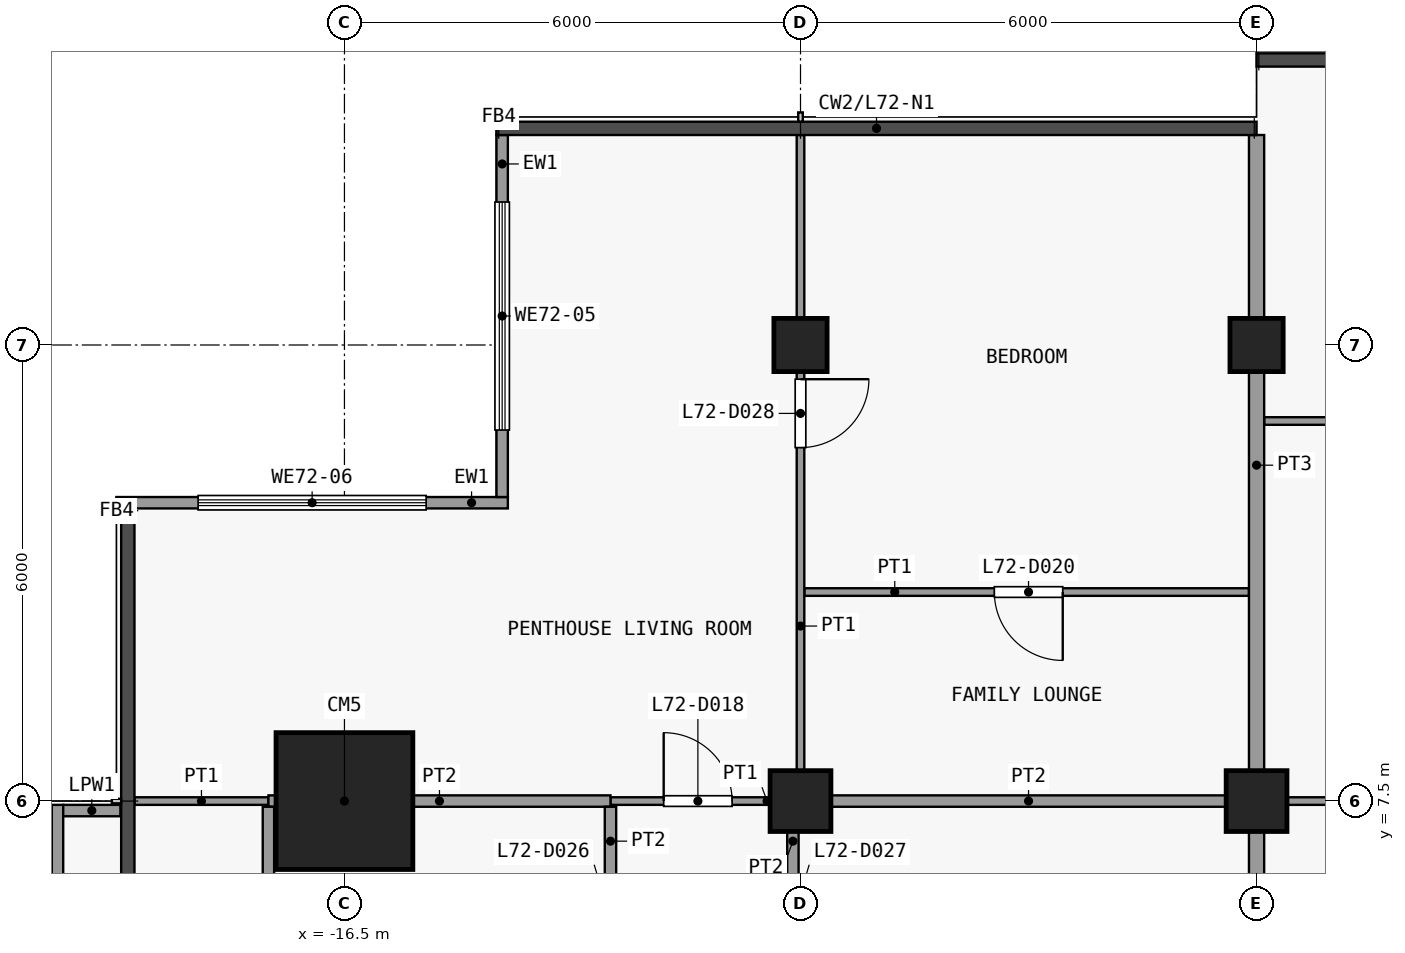
"""IFC4 building model, lengths in metres.
Left out: names, types, materials, properties, quantities, classifications, styles, units other than length and angle.
Written with IfcOpenShell. Run it as: python <this file> out.ifc"""

import sys

from ifc_helpers import new_model, si_unit, direction, frame, frame_2d, origin, origin_2d, place, context, subcontext, project, spatial, rectangle, extrude, element, fill, save


model = new_model("IFC4")
c1 = context("Model", 3, precision=1e-05, world=origin(), true_north=direction((0.0, 1.0)))
c2 = subcontext(c1, "Body", "Model", "MODEL_VIEW")
j1 = project(units=[si_unit("LENGTHUNIT", "METRE"), si_unit("PLANEANGLEUNIT", "RADIAN")], contexts=[c1])
p1 = place(None, origin())
s1 = spatial("IfcSite", under=j1, at=p1, CompositionType="ELEMENT")
p2 = place(p1, origin())
s2 = spatial("IfcBuilding", under=s1, at=p2, CompositionType="ELEMENT")
p3 = place(p2, frame((0.0, 0.0, 284.3)))
s3 = spatial("IfcBuildingStorey", under=s2, at=p3, CompositionType="ELEMENT", Elevation=284.3)
p4 = place(p3, frame((-16.5, 7.5, 0.0), z_axis=(0.0, 0.0, 1.0), x_axis=(1.0, 0.0, 0.0)))
e1 = element("IfcColumn", 1, at=p4, inside=s3, PredefinedType="COLUMN", context=c2, shape_type="SweptSolid", body=[
    extrude(rectangle(XDim=1.8, YDim=1.8, at=origin_2d()), origin(), (0.0, 0.0, 1.0), 3.6),
])
p5 = place(p3, frame((-10.5, 7.5, 0.0), z_axis=(0.0, 0.0, 1.0), x_axis=(1.0, 0.0, 0.0)))
e2 = element("IfcColumn", 2, at=p5, inside=s3, PredefinedType="COLUMN", context=c2, shape_type="SweptSolid", body=[
    extrude(rectangle(XDim=0.8, YDim=0.8, at=origin_2d()), origin(), (0.0, 0.0, 1.0), 3.6),
])
p6 = place(p3, frame((-10.5, 13.5, 0.0), z_axis=(0.0, 0.0, 1.0), x_axis=(1.0, 0.0, 0.0)))
e3 = element("IfcColumn", 3, at=p6, inside=s3, PredefinedType="COLUMN", context=c2, shape_type="SweptSolid", body=[
    extrude(rectangle(XDim=0.7, YDim=0.7, at=origin_2d()), origin(), (0.0, 0.0, 1.0), 3.6),
])
p7 = place(p3, frame((-4.5, 7.5, 0.0), z_axis=(0.0, 0.0, 1.0), x_axis=(1.0, 0.0, 0.0)))
e4 = element("IfcColumn", 4, at=p7, inside=s3, PredefinedType="COLUMN", context=c2, shape_type="SweptSolid", body=[
    extrude(rectangle(XDim=0.8, YDim=0.8, at=origin_2d()), origin(), (0.0, 0.0, 1.0), 3.6),
])
p8 = place(p3, frame((-4.5, 13.5, 0.0), z_axis=(0.0, 0.0, 1.0), x_axis=(1.0, 0.0, 0.0)))
e5 = element("IfcColumn", 5, at=p8, inside=s3, PredefinedType="COLUMN", context=c2, shape_type="SweptSolid", body=[
    extrude(rectangle(XDim=0.7, YDim=0.7, at=origin_2d()), origin(), (0.0, 0.0, 1.0), 3.6),
])
p9 = place(p3, frame((-14.425, 11.5, 0.0), z_axis=(0.0, 0.0, 1.0), x_axis=(0.0, 1.0, 0.0)))
e6 = element("IfcWall", 6, at=p9, inside=s3, PredefinedType="SOLIDWALL", context=c2, shape_type="SweptSolid", body=[
    extrude(rectangle(XDim=4.762, YDim=0.15, at=frame_2d((2.381, 0.0))), origin(), (0.0, 0.0, 1.0), 3.3),
])
p10 = place(p9, frame((0.881, 0.0, 0.9)))
e7 = element("IfcOpeningElement", 7, at=p10, cuts=e6, PredefinedType="OPENING", context=c2, shape_type="SweptSolid", body=[
    extrude(rectangle(XDim=3.0, YDim=2.4, at=frame_2d((1.5, 1.2))), frame((0.0, 0.085, 0.0), z_axis=(0.0, -1.0, 0.0), x_axis=(1.0, 0.0, 0.0)), (0.0, 0.0, 1.0), 0.17),
])
p11 = place(p3, frame((-19.5, 11.425, 0.0), z_axis=(0.0, 0.0, 1.0), x_axis=(1.0, 0.0, 0.0)))
e8 = element("IfcWall", 8, at=p11, inside=s3, PredefinedType="SOLIDWALL", context=c2, shape_type="SweptSolid", body=[
    extrude(rectangle(XDim=5.15, YDim=0.15, at=frame_2d((2.575, 0.0))), origin(), (0.0, 0.0, 1.0), 3.3),
])
p12 = place(p11, frame((1.075, 0.0, 0.9)))
e9 = element("IfcOpeningElement", 9, at=p12, cuts=e8, PredefinedType="OPENING", context=c2, shape_type="SweptSolid", body=[
    extrude(rectangle(XDim=3.0, YDim=2.4, at=frame_2d((1.5, 1.2))), frame((0.0, 0.085, 0.0), z_axis=(0.0, -1.0, 0.0), x_axis=(1.0, 0.0, 0.0)), (0.0, 0.0, 1.0), 0.17),
])
p13 = place(p3, frame((-20.275, 1.448, 0.0), z_axis=(0.0, 0.0, 1.0), x_axis=(0.0, 1.0, 0.0)))
e10 = element("IfcWall", 10, at=p13, inside=s3, PredefinedType="PARAPET", context=c2, shape_type="SweptSolid", body=[
    extrude(rectangle(XDim=6.002, YDim=0.15, at=frame_2d((3.001, 0.0))), origin(), (0.0, 0.0, 1.0), 1.15),
])
p14 = place(p3, frame((-20.2, 7.375, 0.0), z_axis=(0.0, 0.0, 1.0), x_axis=(1.0, 0.0, 0.0)))
e11 = element("IfcWall", 11, at=p14, inside=s3, PredefinedType="PARAPET", context=c2, shape_type="SweptSolid", body=[
    extrude(rectangle(XDim=0.752, YDim=0.15, at=frame_2d((0.376, 0.0))), origin(), (0.0, 0.0, 1.0), 1.15),
])
p15 = place(p3, frame((-19.262, 7.5, 0.0), z_axis=(0.0, 0.0, 1.0), x_axis=(1.0, 0.0, 0.0)))
e12 = element("IfcWall", 12, at=p15, inside=s3, PredefinedType="PARTITIONING", context=c2, shape_type="SweptSolid", body=[
    extrude(rectangle(XDim=1.762, YDim=0.1, at=frame_2d((0.881, 0.0))), origin(), (0.0, 0.0, 1.0), 3.3),
])
p16 = place(p3, frame((-13.0, 7.5, 0.0), z_axis=(0.0, 0.0, 1.0), x_axis=(1.0, 0.0, 0.0)))
e13 = element("IfcWall", 13, at=p16, inside=s3, PredefinedType="PARTITIONING", context=c2, shape_type="SweptSolid", body=[
    extrude(rectangle(XDim=2.4, YDim=0.1, at=frame_2d((1.2, 0.0))), origin(), (0.0, 0.0, 1.0), 3.3),
])
p17 = place(p16, frame((0.7, 0.0, 0.0)))
e14 = element("IfcOpeningElement", 14, at=p17, cuts=e13, PredefinedType="OPENING", context=c2, shape_type="SweptSolid", body=[
    extrude(rectangle(XDim=0.9, YDim=2.1, at=frame_2d((0.45, 1.05))), frame((0.0, 0.06, 0.0), z_axis=(0.0, -1.0, 0.0), x_axis=(1.0, 0.0, 0.0)), (0.0, 0.0, 1.0), 0.12),
])
p18 = place(p3, frame((-4.5, 7.5, 0.0), z_axis=(0.0, 0.0, 1.0), x_axis=(1.0, 0.0, 0.0)))
e15 = element("IfcWall", 15, at=p18, inside=s3, PredefinedType="PARTITIONING", context=c2, shape_type="SweptSolid", body=[
    extrude(rectangle(XDim=4.5, YDim=0.1, at=frame_2d((2.25, 0.0))), origin(), (0.0, 0.0, 1.0), 3.3),
])
p19 = place(p3, frame((-17.5, 7.5, 0.0), z_axis=(0.0, 0.0, 1.0), x_axis=(1.0, 0.0, 0.0)))
e16 = element("IfcWall", 16, at=p19, inside=s3, PredefinedType="PARTITIONING", context=c2, shape_type="SweptSolid", body=[
    extrude(rectangle(XDim=4.5, YDim=0.15, at=frame_2d((2.25, 0.0))), origin(), (0.0, 0.0, 1.0), 3.3),
])
p20 = place(p3, frame((-10.5, 7.5, 0.0), z_axis=(0.0, 0.0, 1.0), x_axis=(1.0, 0.0, 0.0)))
e17 = element("IfcWall", 17, at=p20, inside=s3, PredefinedType="PARTITIONING", context=c2, shape_type="SweptSolid", body=[
    extrude(rectangle(XDim=6.0, YDim=0.15, at=frame_2d((3.0, 0.0))), origin(), (0.0, 0.0, 1.0), 3.3),
])
p21 = place(p3, frame((-10.45, 10.25, 0.0), z_axis=(0.0, 0.0, 1.0), x_axis=(1.0, 0.0, 0.0)))
e18 = element("IfcWall", 18, at=p21, inside=s3, PredefinedType="PARTITIONING", context=c2, shape_type="SweptSolid", body=[
    extrude(rectangle(XDim=5.85, YDim=0.1, at=frame_2d((2.925, 0.0))), origin(), (0.0, 0.0, 1.0), 3.3),
])
p22 = place(p21, frame((2.5, 0.0, 0.0)))
e19 = element("IfcOpeningElement", 19, at=p22, cuts=e18, PredefinedType="OPENING", context=c2, shape_type="SweptSolid", body=[
    extrude(rectangle(XDim=0.9, YDim=2.1, at=frame_2d((0.45, 1.05))), frame((0.0, 0.06, 0.0), z_axis=(0.0, -1.0, 0.0), x_axis=(1.0, 0.0, 0.0)), (0.0, 0.0, 1.0), 0.12),
])
p23 = place(p3, frame((-4.4, 12.5, 0.0), z_axis=(0.0, 0.0, 1.0), x_axis=(1.0, 0.0, 0.0)))
e20 = element("IfcWall", 20, at=p23, inside=s3, PredefinedType="PARTITIONING", context=c2, shape_type="SweptSolid", body=[
    extrude(rectangle(XDim=8.85, YDim=0.1, at=frame_2d((4.425, 0.0))), origin(), (0.0, 0.0, 1.0), 3.3),
])
p24 = place(p23, frame((4.0, 0.0, 0.0)))
e21 = element("IfcOpeningElement", 21, at=p24, cuts=e20, PredefinedType="OPENING", context=c2, shape_type="SweptSolid", body=[
    extrude(rectangle(XDim=0.9, YDim=2.1, at=frame_2d((0.45, 1.05))), frame((0.0, 0.06, 0.0), z_axis=(0.0, -1.0, 0.0), x_axis=(1.0, 0.0, 0.0)), (0.0, 0.0, 1.0), 0.12),
])
p25 = place(p3, frame((-17.5, 4.6, 0.0), z_axis=(0.0, 0.0, 1.0), x_axis=(0.0, 1.0, 0.0)))
e22 = element("IfcWall", 22, at=p25, inside=s3, PredefinedType="PARTITIONING", context=c2, shape_type="SweptSolid", body=[
    extrude(rectangle(XDim=2.825, YDim=0.15, at=frame_2d((1.413, 0.0))), origin(), (0.0, 0.0, 1.0), 3.3),
])
p26 = place(p25, frame((1.0, 0.0, 0.0)))
e23 = element("IfcOpeningElement", 23, at=p26, cuts=e22, PredefinedType="OPENING", context=c2, shape_type="SweptSolid", body=[
    extrude(rectangle(XDim=0.9, YDim=2.1, at=frame_2d((0.45, 1.05))), frame((0.0, 0.085, 0.0), z_axis=(0.0, -1.0, 0.0), x_axis=(1.0, 0.0, 0.0)), (0.0, 0.0, 1.0), 0.17),
])
p27 = place(p3, frame((-13.0, 4.6, 0.0), z_axis=(0.0, 0.0, 1.0), x_axis=(0.0, 1.0, 0.0)))
e24 = element("IfcWall", 24, at=p27, inside=s3, PredefinedType="PARTITIONING", context=c2, shape_type="SweptSolid", body=[
    extrude(rectangle(XDim=2.825, YDim=0.15, at=frame_2d((1.413, 0.0))), origin(), (0.0, 0.0, 1.0), 3.3),
])
p28 = place(p27, frame((0.9, 0.0, 0.0)))
e25 = element("IfcOpeningElement", 25, at=p28, cuts=e24, PredefinedType="OPENING", context=c2, shape_type="SweptSolid", body=[
    extrude(rectangle(XDim=0.9, YDim=2.1, at=frame_2d((0.45, 1.05))), frame((0.0, 0.085, 0.0), z_axis=(0.0, -1.0, 0.0), x_axis=(1.0, 0.0, 0.0)), (0.0, 0.0, 1.0), 0.17),
])
p29 = place(p3, frame((-10.6, 4.6, 0.0), z_axis=(0.0, 0.0, 1.0), x_axis=(0.0, 1.0, 0.0)))
e26 = element("IfcWall", 26, at=p29, inside=s3, PredefinedType="PARTITIONING", context=c2, shape_type="SweptSolid", body=[
    extrude(rectangle(XDim=2.825, YDim=0.15, at=frame_2d((1.413, 0.0))), origin(), (0.0, 0.0, 1.0), 3.3),
])
p30 = place(p29, frame((0.9, 0.0, 0.0)))
e27 = element("IfcOpeningElement", 27, at=p30, cuts=e26, PredefinedType="OPENING", context=c2, shape_type="SweptSolid", body=[
    extrude(rectangle(XDim=0.9, YDim=2.1, at=frame_2d((0.45, 1.05))), frame((0.0, 0.085, 0.0), z_axis=(0.0, -1.0, 0.0), x_axis=(1.0, 0.0, 0.0)), (0.0, 0.0, 1.0), 0.17),
])
p31 = place(p3, frame((-10.5, 7.575, 0.0), z_axis=(0.0, 0.0, 1.0), x_axis=(0.0, 1.0, 0.0)))
e28 = element("IfcWall", 28, at=p31, inside=s3, PredefinedType="PARTITIONING", context=c2, shape_type="SweptSolid", body=[
    extrude(rectangle(XDim=8.688, YDim=0.1, at=frame_2d((4.344, 0.0))), origin(), (0.0, 0.0, 1.0), 3.3),
])
p32 = place(p31, frame((4.575, 0.0, 0.0)))
e29 = element("IfcOpeningElement", 29, at=p32, cuts=e28, PredefinedType="OPENING", context=c2, shape_type="SweptSolid", body=[
    extrude(rectangle(XDim=0.9, YDim=2.1, at=frame_2d((0.45, 1.05))), frame((0.0, 0.06, 0.0), z_axis=(0.0, -1.0, 0.0), x_axis=(1.0, 0.0, 0.0)), (0.0, 0.0, 1.0), 0.12),
])
p33 = place(p3, frame((-4.5, 4.6, 0.0), z_axis=(0.0, 0.0, 1.0), x_axis=(0.0, 1.0, 0.0)))
e30 = element("IfcWall", 30, at=p33, inside=s3, PredefinedType="PARTITIONING", context=c2, shape_type="SweptSolid", body=[
    extrude(rectangle(XDim=2.825, YDim=0.2, at=frame_2d((1.413, 0.0))), origin(), (0.0, 0.0, 1.0), 3.3),
])
p34 = place(p3, frame((-4.5, 7.575, 0.0), z_axis=(0.0, 0.0, 1.0), x_axis=(0.0, 1.0, 0.0)))
e31 = element("IfcWall", 31, at=p34, inside=s3, PredefinedType="PARTITIONING", context=c2, shape_type="SweptSolid", body=[
    extrude(rectangle(XDim=8.688, YDim=0.2, at=frame_2d((4.344, 0.0))), origin(), (0.0, 0.0, 1.0), 3.3),
])
p35 = place(p10, origin())
e32 = element("IfcWindow", 32, at=p35, inside=s3, PartitioningType="SINGLE_PANEL", PredefinedType="WINDOW", context=c2, shape_type="SweptSolid", body=[
    extrude(rectangle(XDim=3.0, YDim=2.4, at=frame_2d((1.5, 1.2))), frame((0.0, 0.03, 0.0), z_axis=(0.0, -1.0, 0.0), x_axis=(1.0, 0.0, 0.0)), (0.0, 0.0, 1.0), 0.06),
])
fill(e7, e32)
p36 = place(p12, origin())
e33 = element("IfcWindow", 33, at=p36, inside=s3, PartitioningType="SINGLE_PANEL", PredefinedType="WINDOW", context=c2, shape_type="SweptSolid", body=[
    extrude(rectangle(XDim=3.0, YDim=2.4, at=frame_2d((1.5, 1.2))), frame((0.0, 0.03, 0.0), z_axis=(0.0, -1.0, 0.0), x_axis=(1.0, 0.0, 0.0)), (0.0, 0.0, 1.0), 0.06),
])
fill(e9, e33)
p37 = place(p17, origin())
e34 = element("IfcDoor", 34, at=p37, inside=s3, OperationType="SINGLE_SWING_RIGHT", PredefinedType="DOOR", context=c2, shape_type="SweptSolid", body=[
    extrude(rectangle(XDim=0.9, YDim=2.1, at=frame_2d((0.45, 1.05))), frame((0.0, 0.025, 0.0), z_axis=(0.0, -1.0, 0.0), x_axis=(1.0, 0.0, 0.0)), (0.0, 0.0, 1.0), 0.05),
])
fill(e14, e34)
p38 = place(p22, origin())
e35 = element("IfcDoor", 35, at=p38, inside=s3, OperationType="SINGLE_SWING_RIGHT", PredefinedType="DOOR", context=c2, shape_type="SweptSolid", body=[
    extrude(rectangle(XDim=0.9, YDim=2.1, at=frame_2d((0.45, 1.05))), frame((0.0, 0.025, 0.0), z_axis=(0.0, -1.0, 0.0), x_axis=(1.0, 0.0, 0.0)), (0.0, 0.0, 1.0), 0.05),
])
fill(e19, e35)
p39 = place(p32, origin())
e36 = element("IfcDoor", 36, at=p39, inside=s3, OperationType="SINGLE_SWING_RIGHT", PredefinedType="DOOR", context=c2, shape_type="SweptSolid", body=[
    extrude(rectangle(XDim=0.9, YDim=2.1, at=frame_2d((0.45, 1.05))), frame((0.0, 0.025, 0.0), z_axis=(0.0, -1.0, 0.0), x_axis=(1.0, 0.0, 0.0)), (0.0, 0.0, 1.0), 0.05),
])
fill(e29, e36)
save(model, sys.argv[1])
